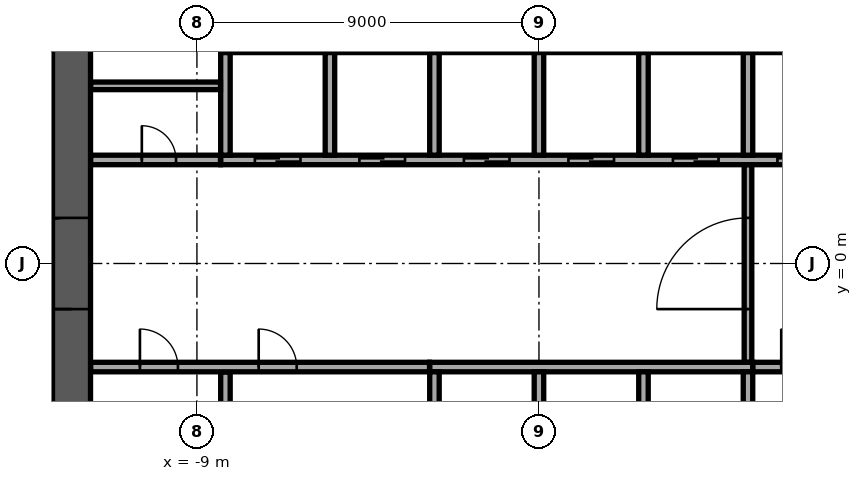
"""IFC4 building model, lengths in metres.
Left out: names, types, materials, properties, quantities, classifications, styles, units other than length and angle.
Written with IfcOpenShell. Run it as: python <this file> out.ifc"""

import sys

from ifc_helpers import new_model, si_unit, direction, frame, frame_2d, origin, place, context, subcontext, project, spatial, rectangle, extrude, element, fill, save


model = new_model("IFC4")
c1 = context("Model", 3, precision=1e-05, world=origin(), true_north=direction((0.0, 1.0)))
c2 = subcontext(c1, "Body", "Model", "MODEL_VIEW")
j1 = project(units=[si_unit("LENGTHUNIT", "METRE"), si_unit("PLANEANGLEUNIT", "RADIAN")], contexts=[c1])
p1 = place(None, origin())
s1 = spatial("IfcSite", under=j1, at=p1, CompositionType="ELEMENT")
p2 = place(p1, origin())
s2 = spatial("IfcBuilding", under=s1, at=p2, CompositionType="ELEMENT")
p3 = place(p2, frame((0.0, 0.0, 163.7)))
s3 = spatial("IfcBuildingStorey", under=s2, at=p3, CompositionType="ELEMENT", Elevation=163.7)
p4 = place(p3, frame((-12.3, -11.8, 0.0), z_axis=(0.0, 0.0, 1.0), x_axis=(0.0, 1.0, 0.0)))
e1 = element("IfcWall", 1, at=p4, inside=s3, PredefinedType="SHEAR", context=c2, shape_type="SweptSolid", body=[
    extrude(rectangle(XDim=23.6, YDim=1.0, at=frame_2d((11.8, 0.0))), origin(), (0.0, 0.0, 1.0), 3.6),
])
p5 = place(p4, frame((10.6, 0.0, 0.0)))
e2 = element("IfcOpeningElement", 2, at=p5, cuts=e1, PredefinedType="OPENING", context=c2, shape_type="SweptSolid", body=[
    extrude(rectangle(XDim=2.4, YDim=2.4, at=frame_2d((1.2, 1.2))), frame((0.0, 0.51, 0.0), z_axis=(0.0, -1.0, 0.0), x_axis=(1.0, 0.0, 0.0)), (0.0, 0.0, 1.0), 1.02),
])
p6 = place(p3, frame((-8.375, 5.7, 0.0), z_axis=(0.0, 0.0, 1.0), x_axis=(1.0, 0.0, 0.0)))
e3 = element("IfcWall", 3, at=p6, inside=s3, PredefinedType="SOLIDWALL", context=c2, shape_type="SweptSolid", body=[
    extrude(rectangle(XDim=16.75, YDim=0.3, at=frame_2d((8.375, 0.0))), origin(), (0.0, 0.0, 1.0), 3.6),
])
p7 = place(p3, frame((-8.375, 2.725, 0.0), z_axis=(0.0, 0.0, 1.0), x_axis=(1.0, 0.0, 0.0)))
e4 = element("IfcWall", 4, at=p7, inside=s3, PredefinedType="SOLIDWALL", context=c2, shape_type="SweptSolid", body=[
    extrude(rectangle(XDim=16.75, YDim=0.25, at=frame_2d((8.375, 0.0))), origin(), (0.0, 0.0, 1.0), 3.6),
])
p8 = place(p7, frame((0.9, 0.0, 0.0)))
e5 = element("IfcOpeningElement", 5, at=p8, cuts=e4, PredefinedType="OPENING", context=c2, shape_type="SweptSolid", body=[
    extrude(rectangle(XDim=1.2, YDim=2.1, at=frame_2d((0.6, 1.05))), frame((0.0, 0.135, 0.0), z_axis=(0.0, -1.0, 0.0), x_axis=(1.0, 0.0, 0.0)), (0.0, 0.0, 1.0), 0.27),
])
p9 = place(p7, frame((3.65, 0.0, 0.0)))
e6 = element("IfcOpeningElement", 6, at=p9, cuts=e4, PredefinedType="OPENING", context=c2, shape_type="SweptSolid", body=[
    extrude(rectangle(XDim=1.2, YDim=2.1, at=frame_2d((0.6, 1.05))), frame((0.0, 0.135, 0.0), z_axis=(0.0, -1.0, 0.0), x_axis=(1.0, 0.0, 0.0)), (0.0, 0.0, 1.0), 0.27),
])
p10 = place(p7, frame((6.4, 0.0, 0.0)))
e7 = element("IfcOpeningElement", 7, at=p10, cuts=e4, PredefinedType="OPENING", context=c2, shape_type="SweptSolid", body=[
    extrude(rectangle(XDim=1.2, YDim=2.1, at=frame_2d((0.6, 1.05))), frame((0.0, 0.135, 0.0), z_axis=(0.0, -1.0, 0.0), x_axis=(1.0, 0.0, 0.0)), (0.0, 0.0, 1.0), 0.27),
])
p11 = place(p7, frame((9.15, 0.0, 0.0)))
e8 = element("IfcOpeningElement", 8, at=p11, cuts=e4, PredefinedType="OPENING", context=c2, shape_type="SweptSolid", body=[
    extrude(rectangle(XDim=1.2, YDim=2.1, at=frame_2d((0.6, 1.05))), frame((0.0, 0.135, 0.0), z_axis=(0.0, -1.0, 0.0), x_axis=(1.0, 0.0, 0.0)), (0.0, 0.0, 1.0), 0.27),
])
p12 = place(p7, frame((11.9, 0.0, 0.0)))
e9 = element("IfcOpeningElement", 9, at=p12, cuts=e4, PredefinedType="OPENING", context=c2, shape_type="SweptSolid", body=[
    extrude(rectangle(XDim=1.2, YDim=2.1, at=frame_2d((0.6, 1.05))), frame((0.0, 0.135, 0.0), z_axis=(0.0, -1.0, 0.0), x_axis=(1.0, 0.0, 0.0)), (0.0, 0.0, 1.0), 0.27),
])
p13 = place(p7, frame((14.65, 0.0, 0.0)))
e10 = element("IfcOpeningElement", 10, at=p13, cuts=e4, PredefinedType="OPENING", context=c2, shape_type="SweptSolid", body=[
    extrude(rectangle(XDim=1.2, YDim=2.1, at=frame_2d((0.6, 1.05))), frame((0.0, 0.135, 0.0), z_axis=(0.0, -1.0, 0.0), x_axis=(1.0, 0.0, 0.0)), (0.0, 0.0, 1.0), 0.27),
])
for number, where, z_axis, x_axis in (
    (11, (-8.25, 2.85, 0.0), (0.0, 0.0, 1.0), (0.0, 1.0, 0.0)),
    (12, (-5.5, 2.85, 0.0), (0.0, 0.0, 1.0), (0.0, 1.0, 0.0)),
    (13, (-2.75, 2.85, 0.0), (0.0, 0.0, 1.0), (0.0, 1.0, 0.0)),
    (14, (0.0, 2.85, 0.0), (0.0, 0.0, 1.0), (0.0, 1.0, 0.0)),
    (15, (2.75, 2.85, 0.0), (0.0, 0.0, 1.0), (0.0, 1.0, 0.0)),
    (16, (5.5, 2.85, 0.0), (0.0, 0.0, 1.0), (0.0, 1.0, 0.0)),
):
    element("IfcWall", number, at=place(p3, frame(where, z_axis=z_axis, x_axis=x_axis)), inside=s3, PredefinedType="SOLIDWALL", context=c2, shape_type="SweptSolid", body=[
        extrude(rectangle(XDim=2.7, YDim=0.25, at=frame_2d((1.35, 0.0))), origin(), (0.0, 0.0, 1.0), 3.6),
    ])
p14 = place(p3, frame((-2.875, -2.725, 0.0), z_axis=(0.0, 0.0, 1.0), x_axis=(1.0, 0.0, 0.0)))
e17 = element("IfcWall", 17, at=p14, inside=s3, PredefinedType="SOLIDWALL", context=c2, shape_type="SweptSolid", body=[
    extrude(rectangle(XDim=8.5, YDim=0.25, at=frame_2d((4.25, 0.0))), origin(), (0.0, 0.0, 1.0), 3.6),
])
for number, where, z_axis, x_axis in (
    (18, (-2.75, -5.55, 0.0), (0.0, 0.0, 1.0), (0.0, 1.0, 0.0)),
    (19, (0.0, -5.55, 0.0), (0.0, 0.0, 1.0), (0.0, 1.0, 0.0)),
    (20, (2.75, -5.55, 0.0), (0.0, 0.0, 1.0), (0.0, 1.0, 0.0)),
    (21, (5.5, -5.55, 0.0), (0.0, 0.0, 1.0), (0.0, 1.0, 0.0)),
):
    element("IfcWall", number, at=place(p3, frame(where, z_axis=z_axis, x_axis=x_axis)), inside=s3, PredefinedType="SOLIDWALL", context=c2, shape_type="SweptSolid", body=[
        extrude(rectangle(XDim=2.7, YDim=0.25, at=frame_2d((1.35, 0.0))), origin(), (0.0, 0.0, 1.0), 3.6),
    ])
p15 = place(p3, frame((-8.25, -5.545, 0.0), z_axis=(0.0, 0.0, 1.0), x_axis=(0.0, 1.0, 0.0)))
e22 = element("IfcWall", 22, at=p15, inside=s3, PredefinedType="PARTITIONING", context=c2, shape_type="SweptSolid", body=[
    extrude(rectangle(XDim=2.69, YDim=0.25, at=frame_2d((1.345, 0.0))), origin(), (0.0, 0.0, 1.0), 3.6),
])
p16 = place(p3, frame((-11.795, -2.725, 0.0), z_axis=(0.0, 0.0, 1.0), x_axis=(1.0, 0.0, 0.0)))
e23 = element("IfcWall", 23, at=p16, inside=s3, PredefinedType="PARTITIONING", context=c2, shape_type="SweptSolid", body=[
    extrude(rectangle(XDim=8.915, YDim=0.25, at=frame_2d((4.458, 0.0))), origin(), (0.0, 0.0, 1.0), 3.6),
])
p17 = place(p16, frame((1.295, 0.0, 0.0)))
e24 = element("IfcOpeningElement", 24, at=p17, cuts=e23, PredefinedType="OPENING", context=c2, shape_type="SweptSolid", body=[
    extrude(rectangle(XDim=1.0, YDim=2.1, at=frame_2d((0.5, 1.05))), frame((0.0, 0.135, 0.0), z_axis=(0.0, -1.0, 0.0), x_axis=(1.0, 0.0, 0.0)), (0.0, 0.0, 1.0), 0.27),
])
p18 = place(p16, frame((4.42, 0.0, 0.0)))
e25 = element("IfcOpeningElement", 25, at=p18, cuts=e23, PredefinedType="OPENING", context=c2, shape_type="SweptSolid", body=[
    extrude(rectangle(XDim=1.0, YDim=2.1, at=frame_2d((0.5, 1.05))), frame((0.0, 0.135, 0.0), z_axis=(0.0, -1.0, 0.0), x_axis=(1.0, 0.0, 0.0)), (0.0, 0.0, 1.0), 0.27),
])
p19 = place(p3, frame((5.63, -2.725, 0.0), z_axis=(0.0, 0.0, 1.0), x_axis=(1.0, 0.0, 0.0)))
e26 = element("IfcWall", 26, at=p19, inside=s3, PredefinedType="PARTITIONING", context=c2, shape_type="SweptSolid", body=[
    extrude(rectangle(XDim=6.165, YDim=0.25, at=frame_2d((3.083, 0.0))), origin(), (0.0, 0.0, 1.0), 3.6),
])
p20 = place(p19, frame((0.745, 0.0, 0.0)))
e27 = element("IfcOpeningElement", 27, at=p20, cuts=e26, PredefinedType="OPENING", context=c2, shape_type="SweptSolid", body=[
    extrude(rectangle(XDim=1.0, YDim=2.1, at=frame_2d((0.5, 1.05))), frame((0.0, 0.135, 0.0), z_axis=(0.0, -1.0, 0.0), x_axis=(1.0, 0.0, 0.0)), (0.0, 0.0, 1.0), 0.27),
])
p21 = place(p19, frame((3.92, 0.0, 0.0)))
e28 = element("IfcOpeningElement", 28, at=p21, cuts=e26, PredefinedType="OPENING", context=c2, shape_type="SweptSolid", body=[
    extrude(rectangle(XDim=0.9, YDim=2.1, at=frame_2d((0.45, 1.05))), frame((0.0, 0.135, 0.0), z_axis=(0.0, -1.0, 0.0), x_axis=(1.0, 0.0, 0.0)), (0.0, 0.0, 1.0), 0.27),
])
p22 = place(p3, frame((5.5, -2.595, 0.0), z_axis=(0.0, 0.0, 1.0), x_axis=(0.0, 1.0, 0.0)))
e29 = element("IfcWall", 29, at=p22, inside=s3, PredefinedType="PARTITIONING", context=c2, shape_type="SweptSolid", body=[
    extrude(rectangle(XDim=5.19, YDim=0.2, at=frame_2d((2.595, 0.0))), origin(), (0.0, 0.0, 1.0), 3.6),
])
p23 = place(p22, frame((1.395, 0.0, 0.0)))
e30 = element("IfcOpeningElement", 30, at=p23, cuts=e29, PredefinedType="OPENING", context=c2, shape_type="SweptSolid", body=[
    extrude(rectangle(XDim=2.4, YDim=2.4, at=frame_2d((1.2, 1.2))), frame((0.0, 0.11, 0.0), z_axis=(0.0, -1.0, 0.0), x_axis=(1.0, 0.0, 0.0)), (0.0, 0.0, 1.0), 0.22),
])
p24 = place(p3, frame((-11.795, 2.725, 0.0), z_axis=(0.0, 0.0, 1.0), x_axis=(1.0, 0.0, 0.0)))
e31 = element("IfcWall", 31, at=p24, inside=s3, PredefinedType="PARTITIONING", context=c2, shape_type="SweptSolid", body=[
    extrude(rectangle(XDim=3.415, YDim=0.25, at=frame_2d((1.708, 0.0))), origin(), (0.0, 0.0, 1.0), 3.6),
])
p25 = place(p24, frame((1.345, 0.0, 0.0)))
e32 = element("IfcOpeningElement", 32, at=p25, cuts=e31, PredefinedType="OPENING", context=c2, shape_type="SweptSolid", body=[
    extrude(rectangle(XDim=0.9, YDim=2.1, at=frame_2d((0.45, 1.05))), frame((0.0, 0.135, 0.0), z_axis=(0.0, -1.0, 0.0), x_axis=(1.0, 0.0, 0.0)), (0.0, 0.0, 1.0), 0.27),
])
p26 = place(p3, frame((-11.795, 4.675, 0.0), z_axis=(0.0, 0.0, 1.0), x_axis=(1.0, 0.0, 0.0)))
e33 = element("IfcWall", 33, at=p26, inside=s3, PredefinedType="PARTITIONING", context=c2, shape_type="SweptSolid", body=[
    extrude(rectangle(XDim=3.415, YDim=0.2, at=frame_2d((1.708, 0.0))), origin(), (0.0, 0.0, 1.0), 3.6),
])
p27 = place(p3, frame((-36.533, -0.245, 0.0), z_axis=(0.0, 0.0, 1.0), x_axis=(0.587787495615, -0.809015364501, 0.0)))
e34 = element("IfcWall", 34, at=p27, inside=s3, PredefinedType="STANDARD", context=c2, shape_type="SweptSolid", body=[
    extrude(rectangle(XDim=42.552, YDim=0.6, at=frame_2d((21.276, 0.0))), origin(), (0.0, 0.0, 1.0), 3.6),
])
p28 = place(p27, frame((1.178, 0.0, 0.9)))
e35 = element("IfcOpeningElement", 35, at=p28, cuts=e34, PredefinedType="OPENING", context=c2, shape_type="SweptSolid", body=[
    extrude(rectangle(XDim=1.8, YDim=2.1, at=frame_2d((0.9, 1.05))), frame((0.0, 0.31, 0.0), z_axis=(0.0, -1.0, 0.0), x_axis=(1.0, 0.0, 0.0)), (0.0, 0.0, 1.0), 0.62),
])
p29 = place(p27, frame((5.396, 0.0, 0.9)))
e36 = element("IfcOpeningElement", 36, at=p29, cuts=e34, PredefinedType="OPENING", context=c2, shape_type="SweptSolid", body=[
    extrude(rectangle(XDim=1.8, YDim=2.1, at=frame_2d((0.9, 1.05))), frame((0.0, 0.31, 0.0), z_axis=(0.0, -1.0, 0.0), x_axis=(1.0, 0.0, 0.0)), (0.0, 0.0, 1.0), 0.62),
])
p30 = place(p27, frame((9.676, 0.0, 0.9)))
e37 = element("IfcOpeningElement", 37, at=p30, cuts=e34, PredefinedType="OPENING", context=c2, shape_type="SweptSolid", body=[
    extrude(rectangle(XDim=1.8, YDim=2.1, at=frame_2d((0.9, 1.05))), frame((0.0, 0.31, 0.0), z_axis=(0.0, -1.0, 0.0), x_axis=(1.0, 0.0, 0.0)), (0.0, 0.0, 1.0), 0.62),
])
p31 = place(p27, frame((13.956, 0.0, 0.9)))
e38 = element("IfcOpeningElement", 38, at=p31, cuts=e34, PredefinedType="OPENING", context=c2, shape_type="SweptSolid", body=[
    extrude(rectangle(XDim=1.8, YDim=2.1, at=frame_2d((0.9, 1.05))), frame((0.0, 0.31, 0.0), z_axis=(0.0, -1.0, 0.0), x_axis=(1.0, 0.0, 0.0)), (0.0, 0.0, 1.0), 0.62),
])
p32 = place(p27, frame((18.236, 0.0, 0.9)))
e39 = element("IfcOpeningElement", 39, at=p32, cuts=e34, PredefinedType="OPENING", context=c2, shape_type="SweptSolid", body=[
    extrude(rectangle(XDim=1.8, YDim=2.1, at=frame_2d((0.9, 1.05))), frame((0.0, 0.31, 0.0), z_axis=(0.0, -1.0, 0.0), x_axis=(1.0, 0.0, 0.0)), (0.0, 0.0, 1.0), 0.62),
])
p33 = place(p27, frame((22.516, 0.0, 0.9)))
e40 = element("IfcOpeningElement", 40, at=p33, cuts=e34, PredefinedType="OPENING", context=c2, shape_type="SweptSolid", body=[
    extrude(rectangle(XDim=1.8, YDim=2.1, at=frame_2d((0.9, 1.05))), frame((0.0, 0.31, 0.0), z_axis=(0.0, -1.0, 0.0), x_axis=(1.0, 0.0, 0.0)), (0.0, 0.0, 1.0), 0.62),
])
p34 = place(p27, frame((26.796, 0.0, 0.9)))
e41 = element("IfcOpeningElement", 41, at=p34, cuts=e34, PredefinedType="OPENING", context=c2, shape_type="SweptSolid", body=[
    extrude(rectangle(XDim=1.8, YDim=2.1, at=frame_2d((0.9, 1.05))), frame((0.0, 0.31, 0.0), z_axis=(0.0, -1.0, 0.0), x_axis=(1.0, 0.0, 0.0)), (0.0, 0.0, 1.0), 0.62),
])
p35 = place(p27, frame((31.076, 0.0, 0.9)))
e42 = element("IfcOpeningElement", 42, at=p35, cuts=e34, PredefinedType="OPENING", context=c2, shape_type="SweptSolid", body=[
    extrude(rectangle(XDim=1.8, YDim=2.1, at=frame_2d((0.9, 1.05))), frame((0.0, 0.31, 0.0), z_axis=(0.0, -1.0, 0.0), x_axis=(1.0, 0.0, 0.0)), (0.0, 0.0, 1.0), 0.62),
])
p36 = place(p27, frame((35.356, 0.0, 0.9)))
e43 = element("IfcOpeningElement", 43, at=p36, cuts=e34, PredefinedType="OPENING", context=c2, shape_type="SweptSolid", body=[
    extrude(rectangle(XDim=1.8, YDim=2.1, at=frame_2d((0.9, 1.05))), frame((0.0, 0.31, 0.0), z_axis=(0.0, -1.0, 0.0), x_axis=(1.0, 0.0, 0.0)), (0.0, 0.0, 1.0), 0.62),
])
p37 = place(p27, frame((39.573, 0.0, 0.9)))
e44 = element("IfcOpeningElement", 44, at=p37, cuts=e34, PredefinedType="OPENING", context=c2, shape_type="SweptSolid", body=[
    extrude(rectangle(XDim=1.8, YDim=2.1, at=frame_2d((0.9, 1.05))), frame((0.0, 0.31, 0.0), z_axis=(0.0, -1.0, 0.0), x_axis=(1.0, 0.0, 0.0)), (0.0, 0.0, 1.0), 0.62),
])
p38 = place(p3, frame((-26.437, -1.589, 0.0), z_axis=(0.0, 0.0, 1.0), x_axis=(0.587768879666, -0.809028889531, 0.0)))
e45 = element("IfcWall", 45, at=p38, inside=s3, PredefinedType="PARTITIONING", context=c2, shape_type="SweptSolid", body=[
    extrude(rectangle(XDim=28.583, YDim=0.15, at=frame_2d((14.292, 0.0))), origin(), (0.0, 0.0, 1.0), 3.15),
])
p39 = place(p38, frame((16.711, 0.0, 0.0)))
e46 = element("IfcOpeningElement", 46, at=p39, cuts=e45, PredefinedType="OPENING", context=c2, shape_type="SweptSolid", body=[
    extrude(rectangle(XDim=1.0, YDim=2.1, at=frame_2d((0.5, 1.05))), frame((0.0, 0.085, 0.0), z_axis=(0.0, -1.0, 0.0), x_axis=(1.0, 0.0, 0.0)), (0.0, 0.0, 1.0), 0.17),
])
p40 = place(p3, frame((-26.166, 4.749, 0.0), z_axis=(0.0, 0.0, 1.0), x_axis=(0.809023795939, 0.587775890628, 0.0)))
e47 = element("IfcWall", 47, at=p40, inside=s3, PredefinedType="PARTITIONING", context=c2, shape_type="SweptSolid", body=[
    extrude(rectangle(XDim=36.756, YDim=0.15, at=frame_2d((18.378, 0.0))), origin(), (0.0, 0.0, 1.0), 3.15),
])
p41 = place(p40, frame((1.8, 0.0, 0.0)))
e48 = element("IfcOpeningElement", 48, at=p41, cuts=e47, PredefinedType="OPENING", context=c2, shape_type="SweptSolid", body=[
    extrude(rectangle(XDim=1.0, YDim=2.1, at=frame_2d((0.5, 1.05))), frame((0.0, 0.085, 0.0), z_axis=(0.0, -1.0, 0.0), x_axis=(1.0, 0.0, 0.0)), (0.0, 0.0, 1.0), 0.17),
])
p42 = place(p40, frame((7.453, 0.0, 0.0)))
e49 = element("IfcOpeningElement", 49, at=p42, cuts=e47, PredefinedType="OPENING", context=c2, shape_type="SweptSolid", body=[
    extrude(rectangle(XDim=1.0, YDim=2.1, at=frame_2d((0.5, 1.05))), frame((0.0, 0.085, 0.0), z_axis=(0.0, -1.0, 0.0), x_axis=(1.0, 0.0, 0.0)), (0.0, 0.0, 1.0), 0.17),
])
p43 = place(p40, frame((20.671, 0.0, 0.0)))
e50 = element("IfcOpeningElement", 50, at=p43, cuts=e47, PredefinedType="OPENING", context=c2, shape_type="SweptSolid", body=[
    extrude(rectangle(XDim=1.0, YDim=2.1, at=frame_2d((0.5, 1.05))), frame((0.0, 0.085, 0.0), z_axis=(0.0, -1.0, 0.0), x_axis=(1.0, 0.0, 0.0)), (0.0, 0.0, 1.0), 0.17),
])
p44 = place(p40, frame((27.382, 0.0, 0.0)))
e51 = element("IfcOpeningElement", 51, at=p44, cuts=e47, PredefinedType="OPENING", context=c2, shape_type="SweptSolid", body=[
    extrude(rectangle(XDim=1.8, YDim=2.1, at=frame_2d((0.9, 1.05))), frame((0.0, 0.085, 0.0), z_axis=(0.0, -1.0, 0.0), x_axis=(1.0, 0.0, 0.0)), (0.0, 0.0, 1.0), 0.17),
])
p45 = place(p5, origin())
e52 = element("IfcDoor", 52, at=p45, inside=s3, OperationType="SINGLE_SWING_LEFT", PredefinedType="DOOR", context=c2, shape_type="SweptSolid", body=[
    extrude(rectangle(XDim=2.4, YDim=2.4, at=frame_2d((1.2, 1.2))), frame((0.0, 0.025, 0.0), z_axis=(0.0, -1.0, 0.0), x_axis=(1.0, 0.0, 0.0)), (0.0, 0.0, 1.0), 0.05),
])
fill(e2, e52)
p46 = place(p8, origin())
e53 = element("IfcDoor", 53, at=p46, inside=s3, OperationType="DOUBLE_DOOR_SLIDING", PredefinedType="DOOR", context=c2, shape_type="SweptSolid", body=[
    extrude(rectangle(XDim=1.2, YDim=2.1, at=frame_2d((0.6, 1.05))), frame((0.0, 0.025, 0.0), z_axis=(0.0, -1.0, 0.0), x_axis=(1.0, 0.0, 0.0)), (0.0, 0.0, 1.0), 0.05),
])
fill(e5, e53)
p47 = place(p9, origin())
e54 = element("IfcDoor", 54, at=p47, inside=s3, OperationType="DOUBLE_DOOR_SLIDING", PredefinedType="DOOR", context=c2, shape_type="SweptSolid", body=[
    extrude(rectangle(XDim=1.2, YDim=2.1, at=frame_2d((0.6, 1.05))), frame((0.0, 0.025, 0.0), z_axis=(0.0, -1.0, 0.0), x_axis=(1.0, 0.0, 0.0)), (0.0, 0.0, 1.0), 0.05),
])
fill(e6, e54)
p48 = place(p10, origin())
e55 = element("IfcDoor", 55, at=p48, inside=s3, OperationType="DOUBLE_DOOR_SLIDING", PredefinedType="DOOR", context=c2, shape_type="SweptSolid", body=[
    extrude(rectangle(XDim=1.2, YDim=2.1, at=frame_2d((0.6, 1.05))), frame((0.0, 0.025, 0.0), z_axis=(0.0, -1.0, 0.0), x_axis=(1.0, 0.0, 0.0)), (0.0, 0.0, 1.0), 0.05),
])
fill(e7, e55)
p49 = place(p11, origin())
e56 = element("IfcDoor", 56, at=p49, inside=s3, OperationType="DOUBLE_DOOR_SLIDING", PredefinedType="DOOR", context=c2, shape_type="SweptSolid", body=[
    extrude(rectangle(XDim=1.2, YDim=2.1, at=frame_2d((0.6, 1.05))), frame((0.0, 0.025, 0.0), z_axis=(0.0, -1.0, 0.0), x_axis=(1.0, 0.0, 0.0)), (0.0, 0.0, 1.0), 0.05),
])
fill(e8, e56)
p50 = place(p12, origin())
e57 = element("IfcDoor", 57, at=p50, inside=s3, OperationType="DOUBLE_DOOR_SLIDING", PredefinedType="DOOR", context=c2, shape_type="SweptSolid", body=[
    extrude(rectangle(XDim=1.2, YDim=2.1, at=frame_2d((0.6, 1.05))), frame((0.0, 0.025, 0.0), z_axis=(0.0, -1.0, 0.0), x_axis=(1.0, 0.0, 0.0)), (0.0, 0.0, 1.0), 0.05),
])
fill(e9, e57)
p51 = place(p13, origin())
e58 = element("IfcDoor", 58, at=p51, inside=s3, OperationType="DOUBLE_DOOR_SLIDING", PredefinedType="DOOR", context=c2, shape_type="SweptSolid", body=[
    extrude(rectangle(XDim=1.2, YDim=2.1, at=frame_2d((0.6, 1.05))), frame((0.0, 0.025, 0.0), z_axis=(0.0, -1.0, 0.0), x_axis=(1.0, 0.0, 0.0)), (0.0, 0.0, 1.0), 0.05),
])
fill(e10, e58)
p52 = place(p17, origin())
e59 = element("IfcDoor", 59, at=p52, inside=s3, OperationType="SINGLE_SWING_LEFT", PredefinedType="DOOR", context=c2, shape_type="SweptSolid", body=[
    extrude(rectangle(XDim=1.0, YDim=2.1, at=frame_2d((0.5, 1.05))), frame((0.0, 0.025, 0.0), z_axis=(0.0, -1.0, 0.0), x_axis=(1.0, 0.0, 0.0)), (0.0, 0.0, 1.0), 0.05),
])
fill(e24, e59)
p53 = place(p20, origin())
e60 = element("IfcDoor", 60, at=p53, inside=s3, OperationType="SINGLE_SWING_LEFT", PredefinedType="DOOR", context=c2, shape_type="SweptSolid", body=[
    extrude(rectangle(XDim=1.0, YDim=2.1, at=frame_2d((0.5, 1.05))), frame((0.0, 0.025, 0.0), z_axis=(0.0, -1.0, 0.0), x_axis=(1.0, 0.0, 0.0)), (0.0, 0.0, 1.0), 0.05),
])
fill(e27, e60)
p54 = place(p25, origin())
e61 = element("IfcDoor", 61, at=p54, inside=s3, OperationType="SINGLE_SWING_LEFT", PredefinedType="DOOR", context=c2, shape_type="SweptSolid", body=[
    extrude(rectangle(XDim=0.9, YDim=2.1, at=frame_2d((0.45, 1.05))), frame((0.0, 0.025, 0.0), z_axis=(0.0, -1.0, 0.0), x_axis=(1.0, 0.0, 0.0)), (0.0, 0.0, 1.0), 0.05),
])
fill(e32, e61)
p55 = place(p18, origin())
e62 = element("IfcDoor", 62, at=p55, inside=s3, OperationType="SINGLE_SWING_LEFT", PredefinedType="DOOR", context=c2, shape_type="SweptSolid", body=[
    extrude(rectangle(XDim=1.0, YDim=2.1, at=frame_2d((0.5, 1.05))), frame((0.0, 0.025, 0.0), z_axis=(0.0, -1.0, 0.0), x_axis=(1.0, 0.0, 0.0)), (0.0, 0.0, 1.0), 0.05),
])
fill(e25, e62)
p56 = place(p23, origin())
e63 = element("IfcDoor", 63, at=p56, inside=s3, OperationType="SINGLE_SWING_LEFT", PredefinedType="DOOR", context=c2, shape_type="SweptSolid", body=[
    extrude(rectangle(XDim=2.4, YDim=2.4, at=frame_2d((1.2, 1.2))), frame((0.0, 0.025, 0.0), z_axis=(0.0, -1.0, 0.0), x_axis=(1.0, 0.0, 0.0)), (0.0, 0.0, 1.0), 0.05),
])
fill(e30, e63)
save(model, sys.argv[1])
